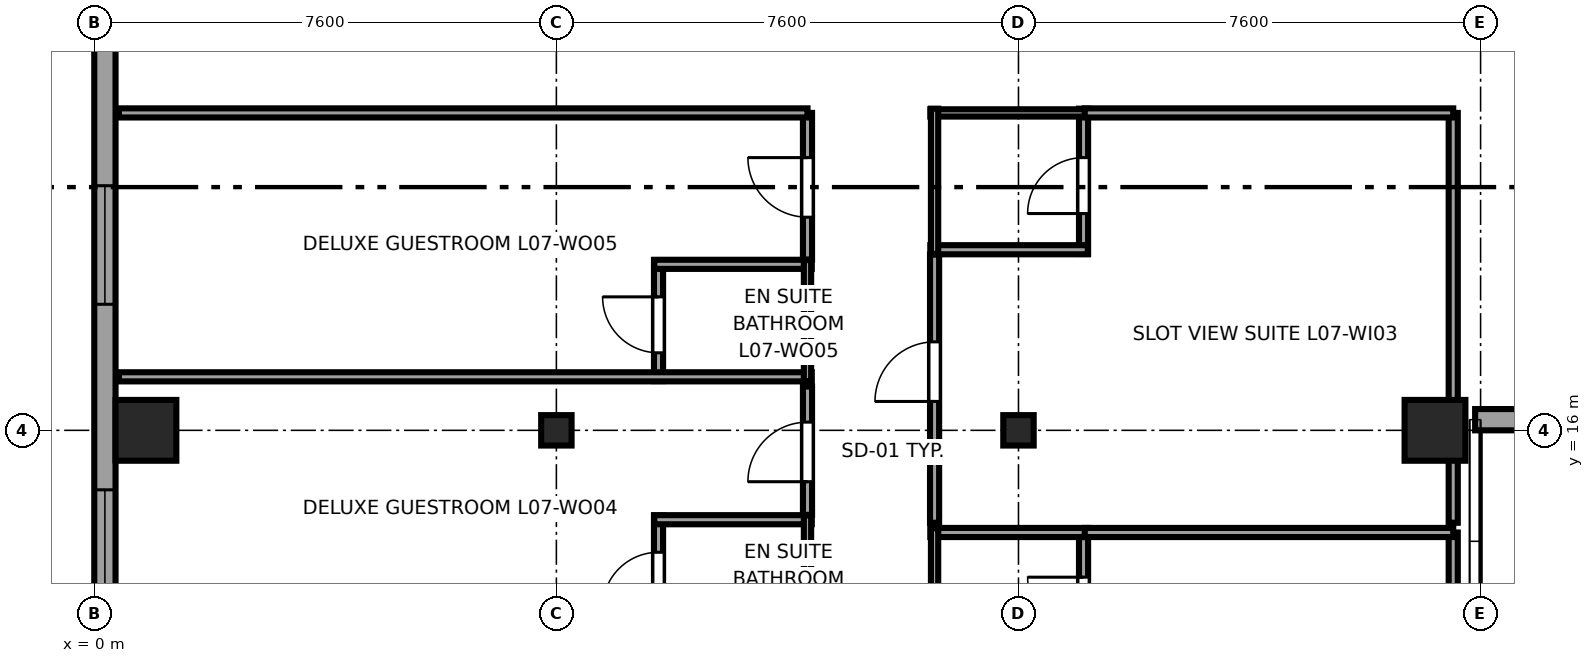
"""IFC4 building model, lengths in metres.
Left out: names, types, materials, properties, quantities, classifications, styles, units other than length and angle.
Written with IfcOpenShell. Run it as: python <this file> out.ifc"""

import sys

from ifc_helpers import new_model, si_unit, direction, frame, frame_2d, origin, origin_2d, place, context, subcontext, project, spatial, rectangle, i_section, extrude, source, transform, mapped, element, fill, save


model = new_model("IFC4")
c1 = context("Model", 3, precision=1e-05, world=origin(), true_north=direction((0.0, 1.0)))
c2 = subcontext(c1, "Body", "Model", "MODEL_VIEW")
j1 = project(units=[si_unit("LENGTHUNIT", "METRE"), si_unit("PLANEANGLEUNIT", "RADIAN")], contexts=[c1])
p1 = place(None, origin())
s1 = spatial("IfcSite", under=j1, at=p1, CompositionType="ELEMENT")
p2 = place(p1, origin())
s2 = spatial("IfcBuilding", under=s1, at=p2, CompositionType="ELEMENT")
p3 = place(p2, frame((0.0, 0.0, 35.55)))
s3 = spatial("IfcBuildingStorey", under=s2, at=p3, CompositionType="ELEMENT", Elevation=35.55)
m1 = source(origin(), c2, "Body", "SweptSolid", [
    extrude(rectangle(XDim=1.0, YDim=1.0, at=origin_2d()), origin(), (0.0, 0.0, 1.0), 3.55),
])
p4 = place(p3, frame((0.85, 16.0, 0.0), z_axis=(0.0, 0.0, 1.0), x_axis=(1.0, 0.0, 0.0)))
e1 = element("IfcColumn", 1, at=p4, inside=s3, PredefinedType="COLUMN", context=c2, shape_type="MappedRepresentation", body=[
    mapped(m1, transform((0.0, 0.0, 0.0), x_axis=(1.0, 0.0, 0.0), y_axis=(0.0, 1.0, 0.0), z_axis=(0.0, 0.0, 1.0), scale=1.0)),
])
m2 = source(origin(), c2, "Body", "SweptSolid", [
    extrude(i_section(OverallWidth=0.5, OverallDepth=0.5, WebThickness=0.028, FlangeThickness=0.045, at=origin_2d()), origin(), (0.0, 0.0, 1.0), 3.55),
])
for number, where, z_axis, x_axis in (
    (2, (7.6, 16.0, 0.0), (0.0, 0.0, 1.0), (1.0, 0.0, 0.0)),
    (3, (15.2, 16.0, 0.0), (0.0, 0.0, 1.0), (1.0, 0.0, 0.0)),
):
    element("IfcColumn", number, at=place(p3, frame(where, z_axis=z_axis, x_axis=x_axis)), inside=s3, PredefinedType="COLUMN", context=c2, shape_type="MappedRepresentation", body=[
        mapped(m2, transform((0.0, 0.0, 0.0), x_axis=(1.0, 0.0, 0.0), y_axis=(0.0, 1.0, 0.0), z_axis=(0.0, 0.0, 1.0), scale=1.0)),
    ])
p5 = place(p3, frame((22.05, 16.0, 0.0), z_axis=(0.0, 0.0, 1.0), x_axis=(1.0, 0.0, 0.0)))
e4 = element("IfcColumn", 4, at=p5, inside=s3, PredefinedType="COLUMN", context=c2, shape_type="MappedRepresentation", body=[
    mapped(m1, transform((0.0, 0.0, 0.0), x_axis=(1.0, 0.0, 0.0), y_axis=(0.0, 1.0, 0.0), z_axis=(0.0, 0.0, 1.0), scale=1.0)),
])
p6 = place(p3, frame((22.71, 16.175, 0.0), z_axis=(0.0, 0.0, 1.0), x_axis=(1.0, 0.0, 0.0)))
e5 = element("IfcWall", 5, at=p6, inside=s3, PredefinedType="SOLIDWALL", context=c2, shape_type="SweptSolid", body=[
    extrude(rectangle(XDim=11.58, YDim=0.35, at=frame_2d((5.79, 0.0))), origin(), (0.0, 0.0, 1.0), 2.748),
])
p7 = place(p6, frame((2.22, 0.0, 0.68)))
e6 = element("IfcOpeningElement", 6, at=p7, cuts=e5, PredefinedType="OPENING", context=c2, shape_type="SweptSolid", body=[
    extrude(rectangle(XDim=1.95, YDim=1.82, at=frame_2d((0.975, 0.91))), frame((0.0, 0.185, 0.0), z_axis=(0.0, -1.0, 0.0), x_axis=(1.0, 0.0, 0.0)), (0.0, 0.0, 1.0), 0.37),
])
p8 = place(p6, frame((7.41, 0.0, 0.68)))
e7 = element("IfcOpeningElement", 7, at=p8, cuts=e5, PredefinedType="OPENING", context=c2, shape_type="SweptSolid", body=[
    extrude(rectangle(XDim=1.95, YDim=1.82, at=frame_2d((0.975, 0.91))), frame((0.0, 0.185, 0.0), z_axis=(0.0, -1.0, 0.0), x_axis=(1.0, 0.0, 0.0)), (0.0, 0.0, 1.0), 0.37),
])
p9 = place(p3, frame((0.175, 41.383, 0.0), z_axis=(0.0, 0.0, 1.0), x_axis=(0.0, -1.0, 0.0)))
e8 = element("IfcWall", 8, at=p9, inside=s3, PredefinedType="SOLIDWALL", context=c2, shape_type="SweptSolid", body=[
    extrude(rectangle(XDim=36.766, YDim=0.35, at=frame_2d((18.383, 0.0))), origin(), (0.0, 0.0, 1.0), 3.37),
])
p10 = place(p9, frame((1.601, 0.0, 0.68)))
e9 = element("IfcOpeningElement", 9, at=p10, cuts=e8, PredefinedType="OPENING", context=c2, shape_type="SweptSolid", body=[
    extrude(rectangle(XDim=1.95, YDim=1.82, at=frame_2d((0.975, 0.91))), frame((0.0, 0.185, 0.0), z_axis=(0.0, -1.0, 0.0), x_axis=(1.0, 0.0, 0.0)), (0.0, 0.0, 1.0), 0.37),
])
p11 = place(p9, frame((4.503, 0.0, 0.68)))
e10 = element("IfcOpeningElement", 10, at=p11, cuts=e8, PredefinedType="OPENING", context=c2, shape_type="SweptSolid", body=[
    extrude(rectangle(XDim=1.95, YDim=1.82, at=frame_2d((0.975, 0.91))), frame((0.0, 0.185, 0.0), z_axis=(0.0, -1.0, 0.0), x_axis=(1.0, 0.0, 0.0)), (0.0, 0.0, 1.0), 0.37),
])
p12 = place(p9, frame((13.456, 0.0, 0.68)))
e11 = element("IfcOpeningElement", 11, at=p12, cuts=e8, PredefinedType="OPENING", context=c2, shape_type="SweptSolid", body=[
    extrude(rectangle(XDim=1.95, YDim=1.82, at=frame_2d((0.975, 0.91))), frame((0.0, 0.185, 0.0), z_axis=(0.0, -1.0, 0.0), x_axis=(1.0, 0.0, 0.0)), (0.0, 0.0, 1.0), 0.37),
])
p13 = place(p9, frame((21.36, 0.0, 0.68)))
e12 = element("IfcOpeningElement", 12, at=p13, cuts=e8, PredefinedType="OPENING", context=c2, shape_type="SweptSolid", body=[
    extrude(rectangle(XDim=1.95, YDim=1.82, at=frame_2d((0.975, 0.91))), frame((0.0, 0.185, 0.0), z_axis=(0.0, -1.0, 0.0), x_axis=(1.0, 0.0, 0.0)), (0.0, 0.0, 1.0), 0.37),
])
p14 = place(p9, frame((26.361, 0.0, 0.68)))
e13 = element("IfcOpeningElement", 13, at=p14, cuts=e8, PredefinedType="OPENING", context=c2, shape_type="SweptSolid", body=[
    extrude(rectangle(XDim=1.95, YDim=1.82, at=frame_2d((0.975, 0.91))), frame((0.0, 0.185, 0.0), z_axis=(0.0, -1.0, 0.0), x_axis=(1.0, 0.0, 0.0)), (0.0, 0.0, 1.0), 0.37),
])
p15 = place(p9, frame((29.263, 0.0, 0.68)))
e14 = element("IfcOpeningElement", 14, at=p15, cuts=e8, PredefinedType="OPENING", context=c2, shape_type="SweptSolid", body=[
    extrude(rectangle(XDim=1.95, YDim=1.82, at=frame_2d((0.975, 0.91))), frame((0.0, 0.185, 0.0), z_axis=(0.0, -1.0, 0.0), x_axis=(1.0, 0.0, 0.0)), (0.0, 0.0, 1.0), 0.37),
])
p16 = place(p9, frame((34.265, 0.0, 0.68)))
e15 = element("IfcOpeningElement", 15, at=p16, cuts=e8, PredefinedType="OPENING", context=c2, shape_type="SweptSolid", body=[
    extrude(rectangle(XDim=1.95, YDim=1.82, at=frame_2d((0.975, 0.91))), frame((0.0, 0.185, 0.0), z_axis=(0.0, -1.0, 0.0), x_axis=(1.0, 0.0, 0.0)), (0.0, 0.0, 1.0), 0.37),
])
p17 = place(p3, frame((9.28, 12.61, 0.0), z_axis=(0.0, 0.0, 1.0), x_axis=(0.0, 1.0, 0.0)))
e16 = element("IfcWall", 16, at=p17, inside=s3, PredefinedType="PARTITIONING", context=c2, shape_type="SweptSolid", body=[
    extrude(rectangle(XDim=1.99, YDim=0.15, at=frame_2d((0.995, 0.0))), origin(), (0.0, 0.0, 1.0), 3.37),
])
p18 = place(p17, frame((0.465, 0.0, 0.0)))
e17 = element("IfcOpeningElement", 17, at=p18, cuts=e16, PredefinedType="OPENING", context=c2, shape_type="SweptSolid", body=[
    extrude(rectangle(XDim=0.92, YDim=2.01, at=frame_2d((0.46, 1.005))), frame((0.0, 0.085, 0.0), z_axis=(0.0, -1.0, 0.0), x_axis=(1.0, 0.0, 0.0)), (0.0, 0.0, 1.0), 0.17),
])
p19 = place(p3, frame((9.21, 14.53, 0.0), z_axis=(0.0, 0.0, 1.0), x_axis=(1.0, 0.0, 0.0)))
e18 = element("IfcWall", 18, at=p19, inside=s3, PredefinedType="PARTITIONING", context=c2, shape_type="SweptSolid", body=[
    extrude(rectangle(XDim=2.59, YDim=0.15, at=frame_2d((1.295, 0.0))), origin(), (0.0, 0.0, 1.0), 3.37),
])
p20 = place(p3, frame((11.73, 12.61, 0.0), z_axis=(0.0, 0.0, 1.0), x_axis=(0.0, 1.0, 0.0)))
e19 = element("IfcWall", 19, at=p20, inside=s3, PredefinedType="PLUMBINGWALL", context=c2, shape_type="SweptSolid", body=[
    extrude(rectangle(XDim=1.99, YDim=0.12, at=frame_2d((0.995, 0.0))), origin(), (0.0, 0.0, 1.0), 3.37),
])
p21 = place(p3, frame((9.28, 16.81, 0.0), z_axis=(0.0, 0.0, 1.0), x_axis=(0.0, 1.0, 0.0)))
e20 = element("IfcWall", 20, at=p21, inside=s3, PredefinedType="PARTITIONING", context=c2, shape_type="SweptSolid", body=[
    extrude(rectangle(XDim=1.99, YDim=0.15, at=frame_2d((0.995, 0.0))), origin(), (0.0, 0.0, 1.0), 3.37),
])
p22 = place(p21, frame((0.465, 0.0, 0.0)))
e21 = element("IfcOpeningElement", 21, at=p22, cuts=e20, PredefinedType="OPENING", context=c2, shape_type="SweptSolid", body=[
    extrude(rectangle(XDim=0.92, YDim=2.01, at=frame_2d((0.46, 1.005))), frame((0.0, 0.085, 0.0), z_axis=(0.0, -1.0, 0.0), x_axis=(1.0, 0.0, 0.0)), (0.0, 0.0, 1.0), 0.17),
])
p23 = place(p3, frame((0.405, 16.88, 0.0), z_axis=(0.0, 0.0, 1.0), x_axis=(1.0, 0.0, 0.0)))
e22 = element("IfcWall", 22, at=p23, inside=s3, PredefinedType="PARTITIONING", context=c2, shape_type="SweptSolid", body=[
    extrude(rectangle(XDim=11.395, YDim=0.15, at=frame_2d((5.698, 0.0))), origin(), (0.0, 0.0, 1.0), 3.37),
])
p24 = place(p3, frame((9.21, 18.73, 0.0), z_axis=(0.0, 0.0, 1.0), x_axis=(1.0, 0.0, 0.0)))
e23 = element("IfcWall", 23, at=p24, inside=s3, PredefinedType="PARTITIONING", context=c2, shape_type="SweptSolid", body=[
    extrude(rectangle(XDim=2.59, YDim=0.15, at=frame_2d((1.295, 0.0))), origin(), (0.0, 0.0, 1.0), 3.37),
])
p25 = place(p3, frame((11.73, 16.81, 0.0), z_axis=(0.0, 0.0, 1.0), x_axis=(0.0, 1.0, 0.0)))
e24 = element("IfcWall", 24, at=p25, inside=s3, PredefinedType="PLUMBINGWALL", context=c2, shape_type="SweptSolid", body=[
    extrude(rectangle(XDim=1.99, YDim=0.12, at=frame_2d((0.995, 0.0))), origin(), (0.0, 0.0, 1.0), 3.37),
])
p26 = place(p3, frame((16.27, 12.0, 0.0), z_axis=(0.0, 0.0, 1.0), x_axis=(0.0, 1.0, 0.0)))
e25 = element("IfcWall", 25, at=p26, inside=s3, PredefinedType="PARTITIONING", context=c2, shape_type="SweptSolid", body=[
    extrude(rectangle(XDim=2.39, YDim=0.15, at=frame_2d((1.195, 0.0))), origin(), (0.0, 0.0, 1.0), 3.37),
])
p27 = place(p26, frame((0.665, 0.0, 0.0)))
e26 = element("IfcOpeningElement", 26, at=p27, cuts=e25, PredefinedType="OPENING", context=c2, shape_type="SweptSolid", body=[
    extrude(rectangle(XDim=0.92, YDim=2.01, at=frame_2d((0.46, 1.005))), frame((0.0, 0.085, 0.0), z_axis=(0.0, -1.0, 0.0), x_axis=(1.0, 0.0, 0.0)), (0.0, 0.0, 1.0), 0.17),
])
p28 = place(p3, frame((13.75, 14.32, 0.0), z_axis=(0.0, 0.0, 1.0), x_axis=(1.0, 0.0, 0.0)))
e27 = element("IfcWall", 27, at=p28, inside=s3, PredefinedType="PARTITIONING", context=c2, shape_type="SweptSolid", body=[
    extrude(rectangle(XDim=2.59, YDim=0.15, at=frame_2d((1.295, 0.0))), origin(), (0.0, 0.0, 1.0), 3.37),
])
p29 = place(p3, frame((13.82, 12.0, 0.0), z_axis=(0.0, 0.0, 1.0), x_axis=(0.0, 1.0, 0.0)))
e28 = element("IfcWall", 28, at=p29, inside=s3, PredefinedType="PLUMBINGWALL", context=c2, shape_type="SweptSolid", body=[
    extrude(rectangle(XDim=2.39, YDim=0.12, at=frame_2d((1.195, 0.0))), origin(), (0.0, 0.0, 1.0), 3.37),
])
p30 = place(p3, frame((16.27, 18.9, 0.0), z_axis=(0.0, 0.0, 1.0), x_axis=(0.0, 1.0, 0.0)))
e29 = element("IfcWall", 29, at=p30, inside=s3, PredefinedType="PARTITIONING", context=c2, shape_type="SweptSolid", body=[
    extrude(rectangle(XDim=2.39, YDim=0.15, at=frame_2d((1.195, 0.0))), origin(), (0.0, 0.0, 1.0), 3.37),
])
p31 = place(p30, frame((0.665, 0.0, 0.0)))
e30 = element("IfcOpeningElement", 30, at=p31, cuts=e29, PredefinedType="OPENING", context=c2, shape_type="SweptSolid", body=[
    extrude(rectangle(XDim=0.92, YDim=2.01, at=frame_2d((0.46, 1.005))), frame((0.0, 0.085, 0.0), z_axis=(0.0, -1.0, 0.0), x_axis=(1.0, 0.0, 0.0)), (0.0, 0.0, 1.0), 0.17),
])
p32 = place(p3, frame((13.75, 18.97, 0.0), z_axis=(0.0, 0.0, 1.0), x_axis=(1.0, 0.0, 0.0)))
e31 = element("IfcWall", 31, at=p32, inside=s3, PredefinedType="PARTITIONING", context=c2, shape_type="SweptSolid", body=[
    extrude(rectangle(XDim=2.59, YDim=0.15, at=frame_2d((1.295, 0.0))), origin(), (0.0, 0.0, 1.0), 3.37),
])
p33 = place(p3, frame((13.75, 21.22, 0.0), z_axis=(0.0, 0.0, 1.0), x_axis=(1.0, 0.0, 0.0)))
e32 = element("IfcWall", 32, at=p33, inside=s3, PredefinedType="PLUMBINGWALL", context=c2, shape_type="SweptSolid", body=[
    extrude(rectangle(XDim=2.59, YDim=0.12, at=frame_2d((1.295, 0.0))), origin(), (0.0, 0.0, 1.0), 3.37),
])
p34 = place(p3, frame((13.82, 18.9, 0.0), z_axis=(0.0, 0.0, 1.0), x_axis=(0.0, 1.0, 0.0)))
e33 = element("IfcWall", 33, at=p34, inside=s3, PredefinedType="PLUMBINGWALL", context=c2, shape_type="SweptSolid", body=[
    extrude(rectangle(XDim=2.39, YDim=0.12, at=frame_2d((1.195, 0.0))), origin(), (0.0, 0.0, 1.0), 3.37),
])
p35 = place(p3, frame((11.73, 14.61, 0.0), z_axis=(0.0, 0.0, 1.0), x_axis=(0.0, 1.0, 0.0)))
e34 = element("IfcWall", 34, at=p35, inside=s3, PredefinedType="PARTITIONING", context=c2, shape_type="SweptSolid", body=[
    extrude(rectangle(XDim=2.11, YDim=0.15, at=frame_2d((1.055, 0.0))), origin(), (0.0, 0.0, 1.0), 3.37),
])
p36 = place(p35, frame((0.545, 0.0, 0.0)))
e35 = element("IfcOpeningElement", 35, at=p36, cuts=e34, PredefinedType="OPENING", context=c2, shape_type="SweptSolid", body=[
    extrude(rectangle(XDim=0.98, YDim=2.12, at=frame_2d((0.49, 1.06))), frame((0.0, 0.085, 0.0), z_axis=(0.0, -1.0, 0.0), x_axis=(1.0, 0.0, 0.0)), (0.0, 0.0, 1.0), 0.17),
])
p37 = place(p3, frame((11.73, 18.81, 0.0), z_axis=(0.0, 0.0, 1.0), x_axis=(0.0, 1.0, 0.0)))
e36 = element("IfcWall", 36, at=p37, inside=s3, PredefinedType="PARTITIONING", context=c2, shape_type="SweptSolid", body=[
    extrude(rectangle(XDim=2.41, YDim=0.15, at=frame_2d((1.205, 0.0))), origin(), (0.0, 0.0, 1.0), 3.37),
])
p38 = place(p37, frame((0.695, 0.0, 0.0)))
e37 = element("IfcOpeningElement", 37, at=p38, cuts=e36, PredefinedType="OPENING", context=c2, shape_type="SweptSolid", body=[
    extrude(rectangle(XDim=0.98, YDim=2.12, at=frame_2d((0.49, 1.06))), frame((0.0, 0.085, 0.0), z_axis=(0.0, -1.0, 0.0), x_axis=(1.0, 0.0, 0.0)), (0.0, 0.0, 1.0), 0.17),
])
p39 = place(p3, frame((0.405, 21.22, 0.0), z_axis=(0.0, 0.0, 1.0), x_axis=(1.0, 0.0, 0.0)))
e38 = element("IfcWall", 38, at=p39, inside=s3, PredefinedType="PARTITIONING", context=c2, shape_type="SweptSolid", body=[
    extrude(rectangle(XDim=11.325, YDim=0.15, at=frame_2d((5.663, 0.0))), origin(), (0.0, 0.0, 1.0), 3.37),
])
p40 = place(p3, frame((22.35, 7.48, 0.0), z_axis=(0.0, 0.0, 1.0), x_axis=(0.0, 1.0, 0.0)))
e39 = element("IfcWall", 39, at=p40, inside=s3, PredefinedType="PARTITIONING", context=c2, shape_type="SweptSolid", body=[
    extrude(rectangle(XDim=6.84, YDim=0.15, at=frame_2d((3.42, 0.0))), origin(), (0.0, 0.0, 1.0), 3.37),
])
p41 = place(p3, frame((16.29, 14.32, 0.0), z_axis=(0.0, 0.0, 1.0), x_axis=(1.0, 0.0, 0.0)))
e40 = element("IfcWall", 40, at=p41, inside=s3, PredefinedType="PARTITIONING", context=c2, shape_type="SweptSolid", body=[
    extrude(rectangle(XDim=6.06, YDim=0.15, at=frame_2d((3.03, 0.0))), origin(), (0.0, 0.0, 1.0), 3.37),
])
p42 = place(p3, frame((13.82, 14.48, 0.0), z_axis=(0.0, 0.0, 1.0), x_axis=(0.0, 1.0, 0.0)))
e41 = element("IfcWall", 41, at=p42, inside=s3, PredefinedType="PARTITIONING", context=c2, shape_type="SweptSolid", body=[
    extrude(rectangle(XDim=4.41, YDim=0.15, at=frame_2d((2.205, 0.0))), origin(), (0.0, 0.0, 1.0), 3.37),
])
p43 = place(p42, frame((1.995, 0.0, 0.0)))
e42 = element("IfcOpeningElement", 42, at=p43, cuts=e41, PredefinedType="OPENING", context=c2, shape_type="SweptSolid", body=[
    extrude(rectangle(XDim=0.98, YDim=2.12, at=frame_2d((0.49, 1.06))), frame((0.0, 0.085, 0.0), z_axis=(0.0, -1.0, 0.0), x_axis=(1.0, 0.0, 0.0)), (0.0, 0.0, 1.0), 0.17),
])
p44 = place(p3, frame((22.35, 14.48, 0.0), z_axis=(0.0, 0.0, 1.0), x_axis=(0.0, 1.0, 0.0)))
e43 = element("IfcWall", 43, at=p44, inside=s3, PredefinedType="PARTITIONING", context=c2, shape_type="SweptSolid", body=[
    extrude(rectangle(XDim=6.74, YDim=0.15, at=frame_2d((3.37, 0.0))), origin(), (0.0, 0.0, 1.0), 3.37),
])
p45 = place(p3, frame((16.29, 21.22, 0.0), z_axis=(0.0, 0.0, 1.0), x_axis=(1.0, 0.0, 0.0)))
e44 = element("IfcWall", 44, at=p45, inside=s3, PredefinedType="PARTITIONING", context=c2, shape_type="SweptSolid", body=[
    extrude(rectangle(XDim=6.06, YDim=0.15, at=frame_2d((3.03, 0.0))), origin(), (0.0, 0.0, 1.0), 3.37),
])
m3 = source(origin(), c2, "Body", "SweptSolid", [
    extrude(rectangle(XDim=1.95, YDim=1.82, at=frame_2d((0.975, 0.91))), frame((0.0, 0.09, 0.0), z_axis=(0.0, -1.0, 0.0), x_axis=(1.0, 0.0, 0.0)), (0.0, 0.0, 1.0), 0.06),
])
p46 = place(p13, origin())
e45 = element("IfcWindow", 45, at=p46, inside=s3, PartitioningType="DOUBLE_PANEL_VERTICAL", PredefinedType="WINDOW", context=c2, shape_type="MappedRepresentation", body=[
    mapped(m3, transform((0.0, 0.0, 0.0), x_axis=(1.0, 0.0, 0.0), y_axis=(0.0, 1.0, 0.0), z_axis=(0.0, 0.0, 1.0), scale=1.0)),
])
fill(e12, e45)
p47 = place(p14, origin())
e46 = element("IfcWindow", 46, at=p47, inside=s3, PartitioningType="DOUBLE_PANEL_VERTICAL", PredefinedType="WINDOW", context=c2, shape_type="MappedRepresentation", body=[
    mapped(m3, transform((0.0, 0.0, 0.0), x_axis=(1.0, 0.0, 0.0), y_axis=(0.0, 1.0, 0.0), z_axis=(0.0, 0.0, 1.0), scale=1.0)),
])
fill(e13, e46)
m4 = source(origin(), c2, "Body", "SweptSolid", [
    extrude(rectangle(XDim=0.92, YDim=2.01, at=frame_2d((0.46, 1.005))), frame((0.0, 0.025, 0.0), z_axis=(0.0, -1.0, 0.0), x_axis=(1.0, 0.0, 0.0)), (0.0, 0.0, 1.0), 0.05),
])
p48 = place(p18, origin())
e47 = element("IfcDoor", 47, at=p48, inside=s3, OperationType="SINGLE_SWING_LEFT", PredefinedType="DOOR", context=c2, shape_type="MappedRepresentation", body=[
    mapped(m4, transform((0.0, 0.0, 0.0), x_axis=(1.0, 0.0, 0.0), y_axis=(0.0, 1.0, 0.0), z_axis=(0.0, 0.0, 1.0), scale=1.0)),
])
fill(e17, e47)
p49 = place(p22, origin())
e48 = element("IfcDoor", 48, at=p49, inside=s3, OperationType="SINGLE_SWING_RIGHT", PredefinedType="DOOR", context=c2, shape_type="MappedRepresentation", body=[
    mapped(m4, transform((0.0, 0.0, 0.0), x_axis=(1.0, 0.0, 0.0), y_axis=(0.0, 1.0, 0.0), z_axis=(0.0, 0.0, 1.0), scale=1.0)),
])
fill(e21, e48)
p50 = place(p27, origin())
e49 = element("IfcDoor", 49, at=p50, inside=s3, OperationType="SINGLE_SWING_RIGHT", PredefinedType="DOOR", context=c2, shape_type="MappedRepresentation", body=[
    mapped(m4, transform((0.0, 0.0, 0.0), x_axis=(1.0, 0.0, 0.0), y_axis=(0.0, 1.0, 0.0), z_axis=(0.0, 0.0, 1.0), scale=1.0)),
])
fill(e26, e49)
p51 = place(p31, origin())
e50 = element("IfcDoor", 50, at=p51, inside=s3, OperationType="SINGLE_SWING_LEFT", PredefinedType="DOOR", context=c2, shape_type="MappedRepresentation", body=[
    mapped(m4, transform((0.0, 0.0, 0.0), x_axis=(1.0, 0.0, 0.0), y_axis=(0.0, 1.0, 0.0), z_axis=(0.0, 0.0, 1.0), scale=1.0)),
])
fill(e30, e50)
m5 = source(origin(), c2, "Body", "SweptSolid", [
    extrude(rectangle(XDim=0.98, YDim=2.12, at=frame_2d((0.49, 1.06))), frame((0.0, 0.025, 0.0), z_axis=(0.0, -1.0, 0.0), x_axis=(1.0, 0.0, 0.0)), (0.0, 0.0, 1.0), 0.05),
])
p52 = place(p36, origin())
e51 = element("IfcDoor", 51, at=p52, inside=s3, OperationType="SINGLE_SWING_LEFT", PredefinedType="DOOR", context=c2, shape_type="MappedRepresentation", body=[
    mapped(m5, transform((0.0, 0.0, 0.0), x_axis=(1.0, 0.0, 0.0), y_axis=(0.0, 1.0, 0.0), z_axis=(0.0, 0.0, 1.0), scale=1.0)),
])
fill(e35, e51)
p53 = place(p38, origin())
e52 = element("IfcDoor", 52, at=p53, inside=s3, OperationType="SINGLE_SWING_RIGHT", PredefinedType="DOOR", context=c2, shape_type="MappedRepresentation", body=[
    mapped(m5, transform((0.0, 0.0, 0.0), x_axis=(1.0, 0.0, 0.0), y_axis=(0.0, 1.0, 0.0), z_axis=(0.0, 0.0, 1.0), scale=1.0)),
])
fill(e37, e52)
p54 = place(p43, origin())
e53 = element("IfcDoor", 53, at=p54, inside=s3, OperationType="SINGLE_SWING_LEFT", PredefinedType="DOOR", context=c2, shape_type="MappedRepresentation", body=[
    mapped(m5, transform((0.0, 0.0, 0.0), x_axis=(1.0, 0.0, 0.0), y_axis=(0.0, 1.0, 0.0), z_axis=(0.0, 0.0, 1.0), scale=1.0)),
])
fill(e42, e53)
save(model, sys.argv[1])
